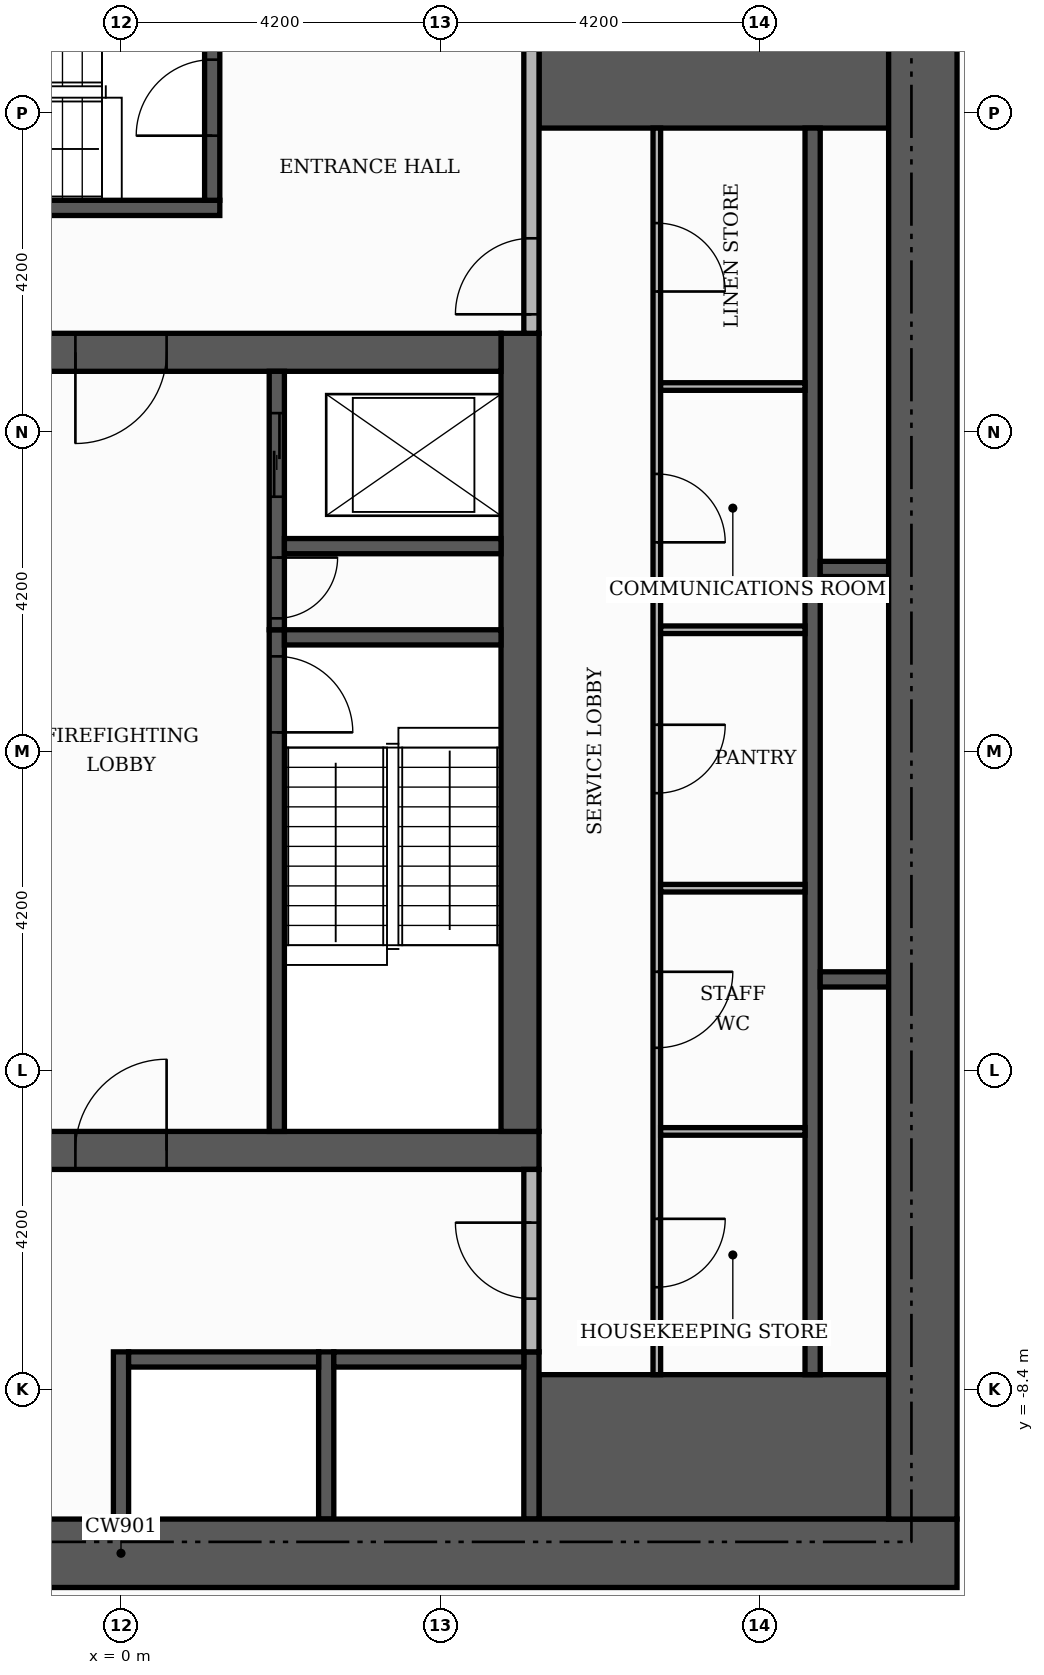
"""IFC4 building model, lengths in metres.
Left out: names, types, materials, properties, quantities, classifications, styles, units other than length and angle.
Written with IfcOpenShell. Run it as: python <this file> out.ifc"""

import sys

from ifc_helpers import new_model, si_unit, direction, frame, frame_2d, origin, place, context, subcontext, project, spatial, rectangle, extrude, element, fill, save


model = new_model("IFC4")
c1 = context("Model", 3, precision=1e-05, world=origin(), true_north=direction((0.0, 1.0)))
c2 = subcontext(c1, "Body", "Model", "MODEL_VIEW")
j1 = project(units=[si_unit("LENGTHUNIT", "METRE"), si_unit("PLANEANGLEUNIT", "RADIAN")], contexts=[c1])
p1 = place(None, origin())
s1 = spatial("IfcSite", under=j1, at=p1, CompositionType="ELEMENT")
p2 = place(p1, origin())
s2 = spatial("IfcBuilding", under=s1, at=p2, CompositionType="ELEMENT")
p3 = place(p2, frame((0.0, 0.0, 46.5)))
s3 = spatial("IfcBuildingStorey", under=s2, at=p3, CompositionType="ELEMENT", Elevation=46.5)
p4 = place(p3, frame((-5.5, -5.25, 0.0), z_axis=(0.0, 0.0, 1.0), x_axis=(1.0, 0.0, 0.0)))
e1 = element("IfcWall", 1, at=p4, inside=s3, PredefinedType="SHEAR", context=c2, shape_type="SweptSolid", body=[
    extrude(rectangle(XDim=11.0, YDim=0.5, at=frame_2d((5.5, 0.0))), origin(), (0.0, 0.0, 1.0), 3.48),
])
p5 = place(p4, frame((4.9, 0.0, 0.0)))
e2 = element("IfcOpeningElement", 2, at=p5, cuts=e1, PredefinedType="OPENING", context=c2, shape_type="SweptSolid", body=[
    extrude(rectangle(XDim=1.2, YDim=2.1, at=frame_2d((0.6, 1.05))), frame((0.0, 0.26, 0.0), z_axis=(0.0, -1.0, 0.0), x_axis=(1.0, 0.0, 0.0)), (0.0, 0.0, 1.0), 0.52),
])
p6 = place(p3, frame((5.25, -5.0, 0.0), z_axis=(0.0, 0.0, 1.0), x_axis=(0.0, 1.0, 0.0)))
e3 = element("IfcWall", 3, at=p6, inside=s3, PredefinedType="SHEAR", context=c2, shape_type="SweptSolid", body=[
    extrude(rectangle(XDim=10.5, YDim=0.5, at=frame_2d((5.25, 0.0))), origin(), (0.0, 0.0, 1.0), 3.48),
])
p7 = place(p3, frame((-5.0, 5.25, 0.0), z_axis=(0.0, 0.0, 1.0), x_axis=(1.0, 0.0, 0.0)))
e4 = element("IfcWall", 4, at=p7, inside=s3, PredefinedType="SHEAR", context=c2, shape_type="SweptSolid", body=[
    extrude(rectangle(XDim=10.0, YDim=0.5, at=frame_2d((5.0, 0.0))), origin(), (0.0, 0.0, 1.0), 3.48),
])
p8 = place(p7, frame((4.4, 0.0, 0.0)))
e5 = element("IfcOpeningElement", 5, at=p8, cuts=e4, PredefinedType="OPENING", context=c2, shape_type="SweptSolid", body=[
    extrude(rectangle(XDim=1.2, YDim=2.1, at=frame_2d((0.6, 1.05))), frame((0.0, 0.26, 0.0), z_axis=(0.0, -1.0, 0.0), x_axis=(1.0, 0.0, 0.0)), (0.0, 0.0, 1.0), 0.52),
])
for number, where, z_axis, x_axis in (
    (6, (5.5, -9.15, 0.0), (0.0, 0.0, 1.0), (1.0, 0.0, 0.0)),
    (7, (5.5, 9.15, 0.0), (0.0, 0.0, 1.0), (1.0, 0.0, 0.0)),
):
    element("IfcWall", number, at=place(p3, frame(where, z_axis=z_axis, x_axis=x_axis)), inside=s3, PredefinedType="SHEAR", context=c2, shape_type="SweptSolid", body=[
        extrude(rectangle(XDim=4.6, YDim=1.9, at=frame_2d((2.3, 0.0))), origin(), (0.0, 0.0, 1.0), 3.48),
    ])
p9 = place(p3, frame((2.05, -5.0, 0.0), z_axis=(0.0, 0.0, 1.0), x_axis=(0.0, 1.0, 0.0)))
e8 = element("IfcWall", 8, at=p9, inside=s3, PredefinedType="SHEAR", context=c2, shape_type="SweptSolid", body=[
    extrude(rectangle(XDim=6.6, YDim=0.2, at=frame_2d((3.3, 0.0))), origin(), (0.0, 0.0, 1.0), 3.48),
])
p10 = place(p9, frame((5.25, 0.0, 0.0)))
e9 = element("IfcOpeningElement", 9, at=p10, cuts=e8, PredefinedType="OPENING", context=c2, shape_type="SweptSolid", body=[
    extrude(rectangle(XDim=1.0, YDim=2.1, at=frame_2d((0.5, 1.05))), frame((0.0, 0.11, 0.0), z_axis=(0.0, -1.0, 0.0), x_axis=(1.0, 0.0, 0.0)), (0.0, 0.0, 1.0), 0.22),
])
p11 = place(p3, frame((2.15, 1.5, 0.0), z_axis=(0.0, 0.0, 1.0), x_axis=(1.0, 0.0, 0.0)))
e10 = element("IfcWall", 10, at=p11, inside=s3, PredefinedType="SHEAR", context=c2, shape_type="SweptSolid", body=[
    extrude(rectangle(XDim=2.85, YDim=0.2, at=frame_2d((1.425, 0.0))), origin(), (0.0, 0.0, 1.0), 3.48),
])
p12 = place(p3, frame((-5.5, 7.15, 0.0), z_axis=(0.0, 0.0, 1.0), x_axis=(1.0, 0.0, 0.0)))
e11 = element("IfcWall", 11, at=p12, inside=s3, PredefinedType="SHEAR", context=c2, shape_type="SweptSolid", body=[
    extrude(rectangle(XDim=6.8, YDim=0.2, at=frame_2d((3.4, 0.0))), origin(), (0.0, 0.0, 1.0), 3.48),
])
p13 = place(p3, frame((1.2, 7.25, 0.0), z_axis=(0.0, 0.0, 1.0), x_axis=(0.0, 1.0, 0.0)))
e12 = element("IfcWall", 12, at=p13, inside=s3, PredefinedType="SHEAR", context=c2, shape_type="SweptSolid", body=[
    extrude(rectangle(XDim=2.85, YDim=0.2, at=frame_2d((1.425, 0.0))), origin(), (0.0, 0.0, 1.0), 3.48),
])
p14 = place(p13, frame((0.85, 0.0, 0.0)))
e13 = element("IfcOpeningElement", 13, at=p14, cuts=e12, PredefinedType="OPENING", context=c2, shape_type="SweptSolid", body=[
    extrude(rectangle(XDim=1.0, YDim=2.1, at=frame_2d((0.5, 1.05))), frame((0.0, 0.11, 0.0), z_axis=(0.0, -1.0, 0.0), x_axis=(1.0, 0.0, 0.0)), (0.0, 0.0, 1.0), 0.22),
])
for number, where, z_axis, x_axis in (
    (14, (0.0, -10.1, 0.0), (0.0, 0.0, 1.0), (0.0, 1.0, 0.0)),
    (15, (2.7, -10.1, 0.0), (0.0, 0.0, 1.0), (0.0, 1.0, 0.0)),
    (16, (5.4, -10.1, 0.0), (0.0, 0.0, 1.0), (0.0, 1.0, 0.0)),
):
    element("IfcWall", number, at=place(p3, frame(where, z_axis=z_axis, x_axis=x_axis)), inside=s3, PredefinedType="SHEAR", context=c2, shape_type="SweptSolid", body=[
        extrude(rectangle(XDim=2.2, YDim=0.2, at=frame_2d((1.1, 0.0))), origin(), (0.0, 0.0, 1.0), 3.48),
    ])
p15 = place(p3, frame((9.1, -8.2, 0.0), z_axis=(0.0, 0.0, 1.0), x_axis=(0.0, 1.0, 0.0)))
e17 = element("IfcWall", 17, at=p15, inside=s3, PredefinedType="SHEAR", context=c2, shape_type="SweptSolid", body=[
    extrude(rectangle(XDim=16.4, YDim=0.2, at=frame_2d((8.2, 0.0))), origin(), (0.0, 0.0, 1.0), 3.48),
])
for number, where, z_axis, x_axis in (
    (18, (0.1, -8.0, 0.0), (0.0, 0.0, 1.0), (1.0, 0.0, 0.0)),
    (19, (2.8, -8.0, 0.0), (0.0, 0.0, 1.0), (1.0, 0.0, 0.0)),
):
    element("IfcWall", number, at=place(p3, frame(where, z_axis=z_axis, x_axis=x_axis)), inside=s3, PredefinedType="SHEAR", context=c2, shape_type="SweptSolid", body=[
        extrude(rectangle(XDim=2.5, YDim=0.2, at=frame_2d((1.25, 0.0))), origin(), (0.0, 0.0, 1.0), 3.48),
    ])
p16 = place(p3, frame((9.2, -3.0, 0.0), z_axis=(0.0, 0.0, 1.0), x_axis=(1.0, 0.0, 0.0)))
e20 = element("IfcWall", 20, at=p16, inside=s3, PredefinedType="SHEAR", context=c2, shape_type="SweptSolid", body=[
    extrude(rectangle(XDim=0.9, YDim=0.2, at=frame_2d((0.45, 0.0))), origin(), (0.0, 0.0, 1.0), 3.48),
])
p17 = place(p3, frame((2.05, 1.6, 0.0), z_axis=(0.0, 0.0, 1.0), x_axis=(0.0, 1.0, 0.0)))
e21 = element("IfcWall", 21, at=p17, inside=s3, PredefinedType="SHEAR", context=c2, shape_type="SweptSolid", body=[
    extrude(rectangle(XDim=3.4, YDim=0.2, at=frame_2d((1.7, 0.0))), origin(), (0.0, 0.0, 1.0), 3.48),
])
p18 = place(p17, frame((1.75, 0.0, 0.0)))
e22 = element("IfcOpeningElement", 22, at=p18, cuts=e21, PredefinedType="OPENING", context=c2, shape_type="SweptSolid", body=[
    extrude(rectangle(XDim=1.1, YDim=2.1, at=frame_2d((0.55, 1.05))), frame((0.0, 0.11, 0.0), z_axis=(0.0, -1.0, 0.0), x_axis=(1.0, 0.0, 0.0)), (0.0, 0.0, 1.0), 0.22),
])
p19 = place(p17, frame((0.15, 0.0, 0.0)))
e23 = element("IfcOpeningElement", 23, at=p19, cuts=e21, PredefinedType="OPENING", context=c2, shape_type="SweptSolid", body=[
    extrude(rectangle(XDim=0.8, YDim=2.1, at=frame_2d((0.4, 1.05))), frame((0.0, 0.11, 0.0), z_axis=(0.0, -1.0, 0.0), x_axis=(1.0, 0.0, 0.0)), (0.0, 0.0, 1.0), 0.22),
])
p20 = place(p3, frame((9.2, 2.4, 0.0), z_axis=(0.0, 0.0, 1.0), x_axis=(1.0, 0.0, 0.0)))
e24 = element("IfcWall", 24, at=p20, inside=s3, PredefinedType="SHEAR", context=c2, shape_type="SweptSolid", body=[
    extrude(rectangle(XDim=0.9, YDim=0.2, at=frame_2d((0.45, 0.0))), origin(), (0.0, 0.0, 1.0), 3.48),
])
p21 = place(p3, frame((2.15, 2.7, 0.0), z_axis=(0.0, 0.0, 1.0), x_axis=(1.0, 0.0, 0.0)))
e25 = element("IfcWall", 25, at=p21, inside=s3, PredefinedType="SHEAR", context=c2, shape_type="SweptSolid", body=[
    extrude(rectangle(XDim=2.85, YDim=0.2, at=frame_2d((1.425, 0.0))), origin(), (0.0, 0.0, 1.0), 3.48),
])
p22 = place(p3, frame((-11.0, -10.55, 0.0), z_axis=(0.0, 0.0, 1.0), x_axis=(1.0, 0.0, 0.0)))
e26 = element("IfcWall", 26, at=p22, inside=s3, PredefinedType="SHEAR", context=c2, shape_type="SweptSolid", body=[
    extrude(rectangle(XDim=22.0, YDim=0.9, at=frame_2d((11.0, 0.0))), origin(), (0.0, 0.0, 1.0), 3.48),
])
p23 = place(p22, frame((7.4, 0.0, 0.0)))
e27 = element("IfcOpeningElement", 27, at=p23, cuts=e26, PredefinedType="OPENING", context=c2, shape_type="SweptSolid", body=[
    extrude(rectangle(XDim=1.8, YDim=2.2, at=frame_2d((0.9, 1.1))), frame((0.0, 0.46, 0.0), z_axis=(0.0, -1.0, 0.0), x_axis=(1.0, 0.0, 0.0)), (0.0, 0.0, 1.0), 0.92),
])
p24 = place(p3, frame((10.55, -10.1, 0.0), z_axis=(0.0, 0.0, 1.0), x_axis=(0.0, 1.0, 0.0)))
e28 = element("IfcWall", 28, at=p24, inside=s3, PredefinedType="SHEAR", context=c2, shape_type="SweptSolid", body=[
    extrude(rectangle(XDim=20.2, YDim=0.9, at=frame_2d((10.1, 0.0))), origin(), (0.0, 0.0, 1.0), 3.48),
])
p25 = place(p3, frame((7.05, -8.2, 0.0), z_axis=(0.0, 0.0, 1.0), x_axis=(0.0, 1.0, 0.0)))
e29 = element("IfcWall", 29, at=p25, inside=s3, PredefinedType="PARTITIONING", context=c2, shape_type="SweptSolid", body=[
    extrude(rectangle(XDim=16.4, YDim=0.1, at=frame_2d((8.2, 0.0))), origin(), (0.0, 0.0, 1.0), 3.48),
])
p26 = place(p25, frame((1.15, 0.0, 0.0)))
e30 = element("IfcOpeningElement", 30, at=p26, cuts=e29, PredefinedType="OPENING", context=c2, shape_type="SweptSolid", body=[
    extrude(rectangle(XDim=0.9, YDim=2.1, at=frame_2d((0.45, 1.05))), frame((0.0, 0.06, 0.0), z_axis=(0.0, -1.0, 0.0), x_axis=(1.0, 0.0, 0.0)), (0.0, 0.0, 1.0), 0.12),
])
p27 = place(p25, frame((4.3, 0.0, 0.0)))
e31 = element("IfcOpeningElement", 31, at=p27, cuts=e29, PredefinedType="OPENING", context=c2, shape_type="SweptSolid", body=[
    extrude(rectangle(XDim=1.0, YDim=2.1, at=frame_2d((0.5, 1.05))), frame((0.0, 0.06, 0.0), z_axis=(0.0, -1.0, 0.0), x_axis=(1.0, 0.0, 0.0)), (0.0, 0.0, 1.0), 0.12),
])
p28 = place(p25, frame((7.65, 0.0, 0.0)))
e32 = element("IfcOpeningElement", 32, at=p28, cuts=e29, PredefinedType="OPENING", context=c2, shape_type="SweptSolid", body=[
    extrude(rectangle(XDim=0.9, YDim=2.1, at=frame_2d((0.45, 1.05))), frame((0.0, 0.06, 0.0), z_axis=(0.0, -1.0, 0.0), x_axis=(1.0, 0.0, 0.0)), (0.0, 0.0, 1.0), 0.12),
])
p29 = place(p25, frame((10.95, 0.0, 0.0)))
e33 = element("IfcOpeningElement", 33, at=p29, cuts=e29, PredefinedType="OPENING", context=c2, shape_type="SweptSolid", body=[
    extrude(rectangle(XDim=0.9, YDim=2.1, at=frame_2d((0.45, 1.05))), frame((0.0, 0.06, 0.0), z_axis=(0.0, -1.0, 0.0), x_axis=(1.0, 0.0, 0.0)), (0.0, 0.0, 1.0), 0.12),
])
p30 = place(p25, frame((14.25, 0.0, 0.0)))
e34 = element("IfcOpeningElement", 34, at=p30, cuts=e29, PredefinedType="OPENING", context=c2, shape_type="SweptSolid", body=[
    extrude(rectangle(XDim=0.9, YDim=2.1, at=frame_2d((0.45, 1.05))), frame((0.0, 0.06, 0.0), z_axis=(0.0, -1.0, 0.0), x_axis=(1.0, 0.0, 0.0)), (0.0, 0.0, 1.0), 0.12),
])
p31 = place(p3, frame((5.4, -7.9, 0.0), z_axis=(0.0, 0.0, 1.0), x_axis=(0.0, 1.0, 0.0)))
e35 = element("IfcWall", 35, at=p31, inside=s3, PredefinedType="PARTITIONING", context=c2, shape_type="SweptSolid", body=[
    extrude(rectangle(XDim=2.4, YDim=0.2, at=frame_2d((1.2, 0.0))), origin(), (0.0, 0.0, 1.0), 3.48),
])
p32 = place(p31, frame((0.7, 0.0, 0.0)))
e36 = element("IfcOpeningElement", 36, at=p32, cuts=e35, PredefinedType="OPENING", context=c2, shape_type="SweptSolid", body=[
    extrude(rectangle(XDim=1.0, YDim=2.1, at=frame_2d((0.5, 1.05))), frame((0.0, 0.11, 0.0), z_axis=(0.0, -1.0, 0.0), x_axis=(1.0, 0.0, 0.0)), (0.0, 0.0, 1.0), 0.22),
])
for number, where, z_axis, x_axis in (
    (37, (7.1, -5.0, 0.0), (0.0, 0.0, 1.0), (1.0, 0.0, 0.0)),
    (38, (7.1, -1.8, 0.0), (0.0, 0.0, 1.0), (1.0, 0.0, 0.0)),
    (39, (7.1, 1.6, 0.0), (0.0, 0.0, 1.0), (1.0, 0.0, 0.0)),
    (40, (7.1, 4.8, 0.0), (0.0, 0.0, 1.0), (1.0, 0.0, 0.0)),
):
    element("IfcWall", number, at=place(p3, frame(where, z_axis=z_axis, x_axis=x_axis)), inside=s3, PredefinedType="PARTITIONING", context=c2, shape_type="SweptSolid", body=[
        extrude(rectangle(XDim=1.9, YDim=0.1, at=frame_2d((0.95, 0.0))), origin(), (0.0, 0.0, 1.0), 3.48),
    ])
p33 = place(p3, frame((5.4, 5.5, 0.0), z_axis=(0.0, 0.0, 1.0), x_axis=(0.0, 1.0, 0.0)))
e41 = element("IfcWall", 41, at=p33, inside=s3, PredefinedType="PARTITIONING", context=c2, shape_type="SweptSolid", body=[
    extrude(rectangle(XDim=4.6, YDim=0.2, at=frame_2d((2.3, 0.0))), origin(), (0.0, 0.0, 1.0), 3.48),
])
p34 = place(p33, frame((0.25, 0.0, 0.0)))
e42 = element("IfcOpeningElement", 42, at=p34, cuts=e41, PredefinedType="OPENING", context=c2, shape_type="SweptSolid", body=[
    extrude(rectangle(XDim=1.0, YDim=2.1, at=frame_2d((0.5, 1.05))), frame((0.0, 0.11, 0.0), z_axis=(0.0, -1.0, 0.0), x_axis=(1.0, 0.0, 0.0)), (0.0, 0.0, 1.0), 0.22),
])
p35 = place(p18, origin())
e43 = element("IfcDoor", 43, at=p35, inside=s3, OperationType="SLIDING_TO_LEFT", PredefinedType="DOOR", context=c2, shape_type="SweptSolid", body=[
    extrude(rectangle(XDim=1.1, YDim=2.1, at=frame_2d((0.55, 1.05))), frame((0.0, 0.025, 0.0), z_axis=(0.0, -1.0, 0.0), x_axis=(1.0, 0.0, 0.0)), (0.0, 0.0, 1.0), 0.05),
])
fill(e22, e43)
p36 = place(p10, frame((1.0, 0.0, 0.0), z_axis=(0.0, 0.0, 1.0), x_axis=(-1.0, 0.0, 0.0)))
e44 = element("IfcDoor", 44, at=p36, inside=s3, OperationType="SINGLE_SWING_LEFT", PredefinedType="DOOR", context=c2, shape_type="SweptSolid", body=[
    extrude(rectangle(XDim=1.0, YDim=2.1, at=frame_2d((0.5, 1.05))), frame((0.0, 0.025, 0.0), z_axis=(0.0, -1.0, 0.0), x_axis=(1.0, 0.0, 0.0)), (0.0, 0.0, 1.0), 0.05),
])
fill(e9, e44)
p37 = place(p19, frame((0.8, 0.0, 0.0), z_axis=(0.0, 0.0, 1.0), x_axis=(-1.0, 0.0, 0.0)))
e45 = element("IfcDoor", 45, at=p37, inside=s3, OperationType="SINGLE_SWING_RIGHT", PredefinedType="DOOR", context=c2, shape_type="SweptSolid", body=[
    extrude(rectangle(XDim=0.8, YDim=2.1, at=frame_2d((0.4, 1.05))), frame((0.0, 0.025, 0.0), z_axis=(0.0, -1.0, 0.0), x_axis=(1.0, 0.0, 0.0)), (0.0, 0.0, 1.0), 0.05),
])
fill(e23, e45)
p38 = place(p8, frame((1.2, 0.0, 0.0), z_axis=(0.0, 0.0, 1.0), x_axis=(-1.0, 0.0, 0.0)))
e46 = element("IfcDoor", 46, at=p38, inside=s3, OperationType="SINGLE_SWING_LEFT", PredefinedType="DOOR", context=c2, shape_type="SweptSolid", body=[
    extrude(rectangle(XDim=1.2, YDim=2.1, at=frame_2d((0.6, 1.05))), frame((0.0, 0.025, 0.0), z_axis=(0.0, -1.0, 0.0), x_axis=(1.0, 0.0, 0.0)), (0.0, 0.0, 1.0), 0.05),
])
fill(e5, e46)
p39 = place(p5, origin())
e47 = element("IfcDoor", 47, at=p39, inside=s3, OperationType="SINGLE_SWING_RIGHT", PredefinedType="DOOR", context=c2, shape_type="SweptSolid", body=[
    extrude(rectangle(XDim=1.2, YDim=2.1, at=frame_2d((0.6, 1.05))), frame((0.0, 0.025, 0.0), z_axis=(0.0, -1.0, 0.0), x_axis=(1.0, 0.0, 0.0)), (0.0, 0.0, 1.0), 0.05),
])
fill(e2, e47)
p40 = place(p14, origin())
e48 = element("IfcDoor", 48, at=p40, inside=s3, OperationType="SINGLE_SWING_LEFT", PredefinedType="DOOR", context=c2, shape_type="SweptSolid", body=[
    extrude(rectangle(XDim=1.0, YDim=2.1, at=frame_2d((0.5, 1.05))), frame((0.0, 0.025, 0.0), z_axis=(0.0, -1.0, 0.0), x_axis=(1.0, 0.0, 0.0)), (0.0, 0.0, 1.0), 0.05),
])
fill(e13, e48)
p41 = place(p34, origin())
e49 = element("IfcDoor", 49, at=p41, inside=s3, OperationType="SINGLE_SWING_LEFT", PredefinedType="DOOR", context=c2, shape_type="SweptSolid", body=[
    extrude(rectangle(XDim=1.0, YDim=2.1, at=frame_2d((0.5, 1.05))), frame((0.0, 0.025, 0.0), z_axis=(0.0, -1.0, 0.0), x_axis=(1.0, 0.0, 0.0)), (0.0, 0.0, 1.0), 0.05),
])
fill(e42, e49)
p42 = place(p32, origin())
e50 = element("IfcDoor", 50, at=p42, inside=s3, OperationType="SINGLE_SWING_RIGHT", PredefinedType="DOOR", context=c2, shape_type="SweptSolid", body=[
    extrude(rectangle(XDim=1.0, YDim=2.1, at=frame_2d((0.5, 1.05))), frame((0.0, 0.025, 0.0), z_axis=(0.0, -1.0, 0.0), x_axis=(1.0, 0.0, 0.0)), (0.0, 0.0, 1.0), 0.05),
])
fill(e36, e50)
p43 = place(p26, frame((0.9, 0.0, 0.0), z_axis=(0.0, 0.0, 1.0), x_axis=(-1.0, 0.0, 0.0)))
e51 = element("IfcDoor", 51, at=p43, inside=s3, OperationType="SINGLE_SWING_RIGHT", PredefinedType="DOOR", context=c2, shape_type="SweptSolid", body=[
    extrude(rectangle(XDim=0.9, YDim=2.1, at=frame_2d((0.45, 1.05))), frame((0.0, 0.025, 0.0), z_axis=(0.0, -1.0, 0.0), x_axis=(1.0, 0.0, 0.0)), (0.0, 0.0, 1.0), 0.05),
])
fill(e30, e51)
p44 = place(p27, frame((1.0, 0.0, 0.0), z_axis=(0.0, 0.0, 1.0), x_axis=(-1.0, 0.0, 0.0)))
e52 = element("IfcDoor", 52, at=p44, inside=s3, OperationType="SINGLE_SWING_RIGHT", PredefinedType="DOOR", context=c2, shape_type="SweptSolid", body=[
    extrude(rectangle(XDim=1.0, YDim=2.1, at=frame_2d((0.5, 1.05))), frame((0.0, 0.025, 0.0), z_axis=(0.0, -1.0, 0.0), x_axis=(1.0, 0.0, 0.0)), (0.0, 0.0, 1.0), 0.05),
])
fill(e31, e52)
p45 = place(p28, frame((0.9, 0.0, 0.0), z_axis=(0.0, 0.0, 1.0), x_axis=(-1.0, 0.0, 0.0)))
e53 = element("IfcDoor", 53, at=p45, inside=s3, OperationType="SINGLE_SWING_RIGHT", PredefinedType="DOOR", context=c2, shape_type="SweptSolid", body=[
    extrude(rectangle(XDim=0.9, YDim=2.1, at=frame_2d((0.45, 1.05))), frame((0.0, 0.025, 0.0), z_axis=(0.0, -1.0, 0.0), x_axis=(1.0, 0.0, 0.0)), (0.0, 0.0, 1.0), 0.05),
])
fill(e32, e53)
p46 = place(p29, frame((0.9, 0.0, 0.0), z_axis=(0.0, 0.0, 1.0), x_axis=(-1.0, 0.0, 0.0)))
e54 = element("IfcDoor", 54, at=p46, inside=s3, OperationType="SINGLE_SWING_LEFT", PredefinedType="DOOR", context=c2, shape_type="SweptSolid", body=[
    extrude(rectangle(XDim=0.9, YDim=2.1, at=frame_2d((0.45, 1.05))), frame((0.0, 0.025, 0.0), z_axis=(0.0, -1.0, 0.0), x_axis=(1.0, 0.0, 0.0)), (0.0, 0.0, 1.0), 0.05),
])
fill(e33, e54)
p47 = place(p30, frame((0.9, 0.0, 0.0), z_axis=(0.0, 0.0, 1.0), x_axis=(-1.0, 0.0, 0.0)))
e55 = element("IfcDoor", 55, at=p47, inside=s3, OperationType="SINGLE_SWING_LEFT", PredefinedType="DOOR", context=c2, shape_type="SweptSolid", body=[
    extrude(rectangle(XDim=0.9, YDim=2.1, at=frame_2d((0.45, 1.05))), frame((0.0, 0.025, 0.0), z_axis=(0.0, -1.0, 0.0), x_axis=(1.0, 0.0, 0.0)), (0.0, 0.0, 1.0), 0.05),
])
fill(e34, e55)
save(model, sys.argv[1])
